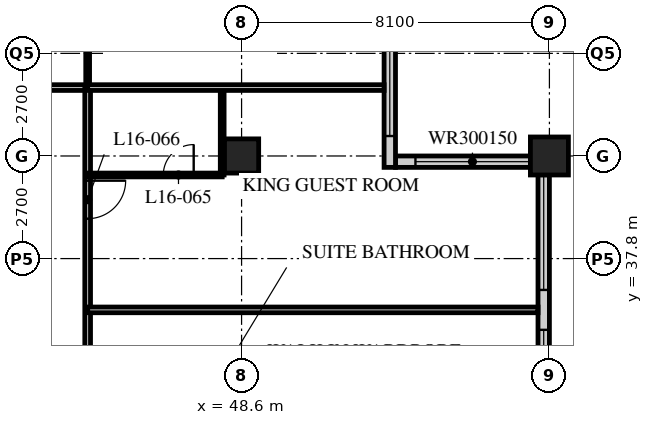
"""IFC4 building model, lengths in metres.
Left out: names, types, materials, properties, quantities, classifications, styles, units other than length and angle.
Written with IfcOpenShell. Run it as: python <this file> out.ifc"""

import sys

from ifc_helpers import new_model, si_unit, direction, frame, frame_2d, origin, origin_2d, place, context, subcontext, project, spatial, rectangle, hollow_rectangle, extrude, element, fill, save


model = new_model("IFC4")
c1 = context("Model", 3, precision=1e-05, world=origin(), true_north=direction((0.0, 1.0)))
c2 = subcontext(c1, "Body", "Model", "MODEL_VIEW")
j1 = project(units=[si_unit("LENGTHUNIT", "METRE"), si_unit("PLANEANGLEUNIT", "RADIAN")], contexts=[c1])
p1 = place(None, origin())
s1 = spatial("IfcSite", under=j1, at=p1, CompositionType="ELEMENT")
p2 = place(p1, origin())
s2 = spatial("IfcBuilding", under=s1, at=p2, CompositionType="ELEMENT")
p3 = place(p2, frame((0.0, 0.0, 67.0)))
s3 = spatial("IfcBuildingStorey", under=s2, at=p3, CompositionType="ELEMENT", Elevation=67.0)
p4 = place(p3, frame((48.6, 40.5, 0.0), z_axis=(0.0, 0.0, 1.0), x_axis=(1.0, 0.0, 0.0)))
e1 = element("IfcColumn", 1, at=p4, inside=s3, PredefinedType="COLUMN", context=c2, shape_type="SweptSolid", body=[
    extrude(hollow_rectangle(XDim=0.9, YDim=0.9, WallThickness=0.09, at=origin_2d()), origin(), (0.0, 0.0, 1.0), 3.4),
])
p5 = place(p3, frame((56.7, 40.5, 0.0), z_axis=(0.0, 0.0, 1.0), x_axis=(1.0, 0.0, 0.0)))
e2 = element("IfcColumn", 2, at=p5, inside=s3, PredefinedType="COLUMN", context=c2, shape_type="SweptSolid", body=[
    extrude(hollow_rectangle(XDim=1.0, YDim=1.0, WallThickness=0.1, at=origin_2d()), origin(), (0.0, 0.0, 1.0), 3.4),
])
p6 = place(p3, frame((56.55, 8.4, 0.0), z_axis=(0.0, 0.0, 1.0), x_axis=(0.0, 1.0, 0.0)))
e3 = element("IfcWall", 3, at=p6, inside=s3, PredefinedType="SOLIDWALL", context=c2, shape_type="SweptSolid", body=[
    extrude(rectangle(XDim=32.1, YDim=0.3, at=frame_2d((16.05, 0.0))), origin(), (0.0, 0.0, 1.0), 3.19),
])
p7 = place(p6, frame((0.225, 0.0, 0.9)))
e4 = element("IfcOpeningElement", 4, at=p7, cuts=e3, PredefinedType="OPENING", context=c2, shape_type="SweptSolid", body=[
    extrude(rectangle(XDim=3.0, YDim=2.0, at=frame_2d((1.5, 1.0))), frame((0.0, 0.16, 0.0), z_axis=(0.0, -1.0, 0.0), x_axis=(1.0, 0.0, 0.0)), (0.0, 0.0, 1.0), 0.32),
])
p8 = place(p6, frame((4.275, 0.0, 0.9)))
e5 = element("IfcOpeningElement", 5, at=p8, cuts=e3, PredefinedType="OPENING", context=c2, shape_type="SweptSolid", body=[
    extrude(rectangle(XDim=3.0, YDim=2.0, at=frame_2d((1.5, 1.0))), frame((0.0, 0.16, 0.0), z_axis=(0.0, -1.0, 0.0), x_axis=(1.0, 0.0, 0.0)), (0.0, 0.0, 1.0), 0.32),
])
p9 = place(p6, frame((8.325, 0.0, 0.9)))
e6 = element("IfcOpeningElement", 6, at=p9, cuts=e3, PredefinedType="OPENING", context=c2, shape_type="SweptSolid", body=[
    extrude(rectangle(XDim=3.0, YDim=2.0, at=frame_2d((1.5, 1.0))), frame((0.0, 0.16, 0.0), z_axis=(0.0, -1.0, 0.0), x_axis=(1.0, 0.0, 0.0)), (0.0, 0.0, 1.0), 0.32),
])
p10 = place(p6, frame((12.375, 0.0, 0.9)))
e7 = element("IfcOpeningElement", 7, at=p10, cuts=e3, PredefinedType="OPENING", context=c2, shape_type="SweptSolid", body=[
    extrude(rectangle(XDim=3.0, YDim=2.0, at=frame_2d((1.5, 1.0))), frame((0.0, 0.16, 0.0), z_axis=(0.0, -1.0, 0.0), x_axis=(1.0, 0.0, 0.0)), (0.0, 0.0, 1.0), 0.32),
])
p11 = place(p6, frame((16.425, 0.0, 0.9)))
e8 = element("IfcOpeningElement", 8, at=p11, cuts=e3, PredefinedType="OPENING", context=c2, shape_type="SweptSolid", body=[
    extrude(rectangle(XDim=3.0, YDim=2.0, at=frame_2d((1.5, 1.0))), frame((0.0, 0.16, 0.0), z_axis=(0.0, -1.0, 0.0), x_axis=(1.0, 0.0, 0.0)), (0.0, 0.0, 1.0), 0.32),
])
p12 = place(p6, frame((20.475, 0.0, 0.9)))
e9 = element("IfcOpeningElement", 9, at=p12, cuts=e3, PredefinedType="OPENING", context=c2, shape_type="SweptSolid", body=[
    extrude(rectangle(XDim=3.0, YDim=2.0, at=frame_2d((1.5, 1.0))), frame((0.0, 0.16, 0.0), z_axis=(0.0, -1.0, 0.0), x_axis=(1.0, 0.0, 0.0)), (0.0, 0.0, 1.0), 0.32),
])
p13 = place(p6, frame((24.525, 0.0, 0.9)))
e10 = element("IfcOpeningElement", 10, at=p13, cuts=e3, PredefinedType="OPENING", context=c2, shape_type="SweptSolid", body=[
    extrude(rectangle(XDim=3.0, YDim=2.0, at=frame_2d((1.5, 1.0))), frame((0.0, 0.16, 0.0), z_axis=(0.0, -1.0, 0.0), x_axis=(1.0, 0.0, 0.0)), (0.0, 0.0, 1.0), 0.32),
])
p14 = place(p6, frame((28.575, 0.0, 0.9)))
e11 = element("IfcOpeningElement", 11, at=p14, cuts=e3, PredefinedType="OPENING", context=c2, shape_type="SweptSolid", body=[
    extrude(rectangle(XDim=3.0, YDim=2.0, at=frame_2d((1.5, 1.0))), frame((0.0, 0.16, 0.0), z_axis=(0.0, -1.0, 0.0), x_axis=(1.0, 0.0, 0.0)), (0.0, 0.0, 1.0), 0.32),
])
p15 = place(p3, frame((56.4, 40.35, 0.0), z_axis=(0.0, 0.0, 1.0), x_axis=(-1.0, 0.0, 0.0)))
e12 = element("IfcWall", 12, at=p15, inside=s3, PredefinedType="SOLIDWALL", context=c2, shape_type="SweptSolid", body=[
    extrude(rectangle(XDim=3.75, YDim=0.3, at=frame_2d((1.875, 0.0))), origin(), (0.0, 0.0, 1.0), 3.19),
])
p16 = place(p15, frame((0.225, 0.0, 0.9)))
e13 = element("IfcOpeningElement", 13, at=p16, cuts=e12, PredefinedType="OPENING", context=c2, shape_type="SweptSolid", body=[
    extrude(rectangle(XDim=3.0, YDim=1.5, at=frame_2d((1.5, 0.75))), frame((0.0, 0.16, 0.0), z_axis=(0.0, -1.0, 0.0), x_axis=(1.0, 0.0, 0.0)), (0.0, 0.0, 1.0), 0.32),
])
p17 = place(p3, frame((52.5, 40.2, 0.0), z_axis=(0.0, 0.0, 1.0), x_axis=(0.0, 1.0, 0.0)))
e14 = element("IfcWall", 14, at=p17, inside=s3, PredefinedType="SOLIDWALL", context=c2, shape_type="SweptSolid", body=[
    extrude(rectangle(XDim=4.35, YDim=0.3, at=frame_2d((2.175, 0.0))), origin(), (0.0, 0.0, 1.0), 3.19),
])
p18 = place(p17, frame((0.825, 0.0, 0.9)))
e15 = element("IfcOpeningElement", 15, at=p18, cuts=e14, PredefinedType="OPENING", context=c2, shape_type="SweptSolid", body=[
    extrude(rectangle(XDim=3.0, YDim=1.5, at=frame_2d((1.5, 0.75))), frame((0.0, 0.16, 0.0), z_axis=(0.0, -1.0, 0.0), x_axis=(1.0, 0.0, 0.0)), (0.0, 0.0, 1.0), 0.32),
])
p19 = place(p3, frame((8.1, 42.3, 0.0), z_axis=(0.0, 0.0, 1.0), x_axis=(1.0, 0.0, 0.0)))
e16 = element("IfcWall", 16, at=p19, inside=s3, PredefinedType="PARTITIONING", context=c2, shape_type="SweptSolid", body=[
    extrude(rectangle(XDim=36.45, YDim=0.15, at=frame_2d((18.225, 0.0))), origin(), (0.0, 0.0, 1.0), 3.19),
])
p20 = place(p19, frame((9.5, 0.0, 0.0)))
e17 = element("IfcOpeningElement", 17, at=p20, cuts=e16, PredefinedType="OPENING", context=c2, shape_type="SweptSolid", body=[
    extrude(rectangle(XDim=1.0, YDim=2.1, at=frame_2d((0.5, 1.05))), frame((0.0, 0.085, 0.0), z_axis=(0.0, -1.0, 0.0), x_axis=(1.0, 0.0, 0.0)), (0.0, 0.0, 1.0), 0.17),
])
p21 = place(p19, frame((14.6, 0.0, 0.0)))
e18 = element("IfcOpeningElement", 18, at=p21, cuts=e16, PredefinedType="OPENING", context=c2, shape_type="SweptSolid", body=[
    extrude(rectangle(XDim=1.0, YDim=2.1, at=frame_2d((0.5, 1.05))), frame((0.0, 0.085, 0.0), z_axis=(0.0, -1.0, 0.0), x_axis=(1.0, 0.0, 0.0)), (0.0, 0.0, 1.0), 0.17),
])
p22 = place(p19, frame((18.65, 0.0, 0.0)))
e19 = element("IfcOpeningElement", 19, at=p22, cuts=e16, PredefinedType="OPENING", context=c2, shape_type="SweptSolid", body=[
    extrude(rectangle(XDim=1.0, YDim=2.1, at=frame_2d((0.5, 1.05))), frame((0.0, 0.085, 0.0), z_axis=(0.0, -1.0, 0.0), x_axis=(1.0, 0.0, 0.0)), (0.0, 0.0, 1.0), 0.17),
])
p23 = place(p19, frame((25.7, 0.0, 0.0)))
e20 = element("IfcOpeningElement", 20, at=p23, cuts=e16, PredefinedType="OPENING", context=c2, shape_type="SweptSolid", body=[
    extrude(rectangle(XDim=1.0, YDim=2.1, at=frame_2d((0.5, 1.05))), frame((0.0, 0.085, 0.0), z_axis=(0.0, -1.0, 0.0), x_axis=(1.0, 0.0, 0.0)), (0.0, 0.0, 1.0), 0.17),
])
p24 = place(p19, frame((30.8, 0.0, 0.0)))
e21 = element("IfcOpeningElement", 21, at=p24, cuts=e16, PredefinedType="OPENING", context=c2, shape_type="SweptSolid", body=[
    extrude(rectangle(XDim=1.0, YDim=2.1, at=frame_2d((0.5, 1.05))), frame((0.0, 0.085, 0.0), z_axis=(0.0, -1.0, 0.0), x_axis=(1.0, 0.0, 0.0)), (0.0, 0.0, 1.0), 0.17),
])
p25 = place(p19, frame((32.825, 0.0, 0.0)))
e22 = element("IfcOpeningElement", 22, at=p25, cuts=e16, PredefinedType="OPENING", context=c2, shape_type="SweptSolid", body=[
    extrude(rectangle(XDim=1.0, YDim=2.1, at=frame_2d((0.5, 1.05))), frame((0.0, 0.085, 0.0), z_axis=(0.0, -1.0, 0.0), x_axis=(1.0, 0.0, 0.0)), (0.0, 0.0, 1.0), 0.17),
])
p26 = place(p19, frame((2.625, 0.0, 0.0)))
e23 = element("IfcOpeningElement", 23, at=p26, cuts=e16, PredefinedType="OPENING", context=c2, shape_type="SweptSolid", body=[
    extrude(rectangle(XDim=1.0, YDim=2.1, at=frame_2d((0.5, 1.05))), frame((0.0, 0.085, 0.0), z_axis=(0.0, -1.0, 0.0), x_axis=(1.0, 0.0, 0.0)), (0.0, 0.0, 1.0), 0.17),
])
p27 = place(p3, frame((44.55, 12.15, 0.0), z_axis=(0.0, 0.0, 1.0), x_axis=(0.0, 1.0, 0.0)))
e24 = element("IfcWall", 24, at=p27, inside=s3, PredefinedType="PARTITIONING", context=c2, shape_type="SweptSolid", body=[
    extrude(rectangle(XDim=30.15, YDim=0.15, at=frame_2d((15.075, 0.0))), origin(), (0.0, 0.0, 1.0), 3.19),
])
p28 = place(p27, frame((2.45, 0.0, 0.0)))
e25 = element("IfcOpeningElement", 25, at=p28, cuts=e24, PredefinedType="OPENING", context=c2, shape_type="SweptSolid", body=[
    extrude(rectangle(XDim=1.0, YDim=2.1, at=frame_2d((0.5, 1.05))), frame((0.0, 0.085, 0.0), z_axis=(0.0, -1.0, 0.0), x_axis=(1.0, 0.0, 0.0)), (0.0, 0.0, 1.0), 0.17),
])
p29 = place(p27, frame((4.35, 0.0, 0.0)))
e26 = element("IfcOpeningElement", 26, at=p29, cuts=e24, PredefinedType="OPENING", context=c2, shape_type="SweptSolid", body=[
    extrude(rectangle(XDim=1.0, YDim=2.1, at=frame_2d((0.5, 1.05))), frame((0.0, 0.085, 0.0), z_axis=(0.0, -1.0, 0.0), x_axis=(1.0, 0.0, 0.0)), (0.0, 0.0, 1.0), 0.17),
])
p30 = place(p27, frame((8.4, 0.0, 0.0)))
e27 = element("IfcOpeningElement", 27, at=p30, cuts=e24, PredefinedType="OPENING", context=c2, shape_type="SweptSolid", body=[
    extrude(rectangle(XDim=1.0, YDim=2.1, at=frame_2d((0.5, 1.05))), frame((0.0, 0.085, 0.0), z_axis=(0.0, -1.0, 0.0), x_axis=(1.0, 0.0, 0.0)), (0.0, 0.0, 1.0), 0.17),
])
p31 = place(p27, frame((14.6, 0.0, 0.0)))
e28 = element("IfcOpeningElement", 28, at=p31, cuts=e24, PredefinedType="OPENING", context=c2, shape_type="SweptSolid", body=[
    extrude(rectangle(XDim=1.0, YDim=2.1, at=frame_2d((0.5, 1.05))), frame((0.0, 0.085, 0.0), z_axis=(0.0, -1.0, 0.0), x_axis=(1.0, 0.0, 0.0)), (0.0, 0.0, 1.0), 0.17),
])
p32 = place(p27, frame((21.65, 0.0, 0.0)))
e29 = element("IfcOpeningElement", 29, at=p32, cuts=e24, PredefinedType="OPENING", context=c2, shape_type="SweptSolid", body=[
    extrude(rectangle(XDim=1.0, YDim=2.1, at=frame_2d((0.5, 1.05))), frame((0.0, 0.085, 0.0), z_axis=(0.0, -1.0, 0.0), x_axis=(1.0, 0.0, 0.0)), (0.0, 0.0, 1.0), 0.17),
])
p33 = place(p27, frame((26.7, 0.0, 0.0)))
e30 = element("IfcOpeningElement", 30, at=p33, cuts=e24, PredefinedType="OPENING", context=c2, shape_type="SweptSolid", body=[
    extrude(rectangle(XDim=1.0, YDim=2.1, at=frame_2d((0.5, 1.05))), frame((0.0, 0.085, 0.0), z_axis=(0.0, -1.0, 0.0), x_axis=(1.0, 0.0, 0.0)), (0.0, 0.0, 1.0), 0.17),
])
p34 = place(p3, frame((44.55, 36.45, 0.0), z_axis=(0.0, 0.0, 1.0), x_axis=(1.0, 0.0, 0.0)))
e31 = element("IfcWall", 31, at=p34, inside=s3, PredefinedType="PARTITIONING", context=c2, shape_type="SweptSolid", body=[
    extrude(rectangle(XDim=11.85, YDim=0.15, at=frame_2d((5.925, 0.0))), origin(), (0.0, 0.0, 1.0), 3.19),
])
p35 = place(p3, frame((48.09, 40.0, 0.0), z_axis=(0.0, 0.0, 1.0), x_axis=(0.0, 1.0, 0.0)))
e32 = element("IfcWall", 32, at=p35, inside=s3, PredefinedType="PARTITIONING", context=c2, shape_type="SweptSolid", body=[
    extrude(rectangle(XDim=2.3, YDim=0.1, at=frame_2d((1.15, 0.0))), origin(), (0.0, 0.0, 1.0), 3.19),
])
p36 = place(p3, frame((44.55, 40.0, 0.0), z_axis=(0.0, 0.0, 1.0), x_axis=(1.0, 0.0, 0.0)))
e33 = element("IfcWall", 33, at=p36, inside=s3, PredefinedType="PARTITIONING", context=c2, shape_type="SweptSolid", body=[
    extrude(rectangle(XDim=3.54, YDim=0.1, at=frame_2d((1.77, 0.0))), origin(), (0.0, 0.0, 1.0), 3.19),
])
p37 = place(p36, frame((1.99, 0.0, 0.0)))
e34 = element("IfcOpeningElement", 34, at=p37, cuts=e33, PredefinedType="OPENING", context=c2, shape_type="SweptSolid", body=[
    extrude(rectangle(XDim=0.8, YDim=2.1, at=frame_2d((0.4, 1.05))), frame((0.0, 0.06, 0.0), z_axis=(0.0, -1.0, 0.0), x_axis=(1.0, 0.0, 0.0)), (0.0, 0.0, 1.0), 0.12),
])
p38 = place(p3, frame((44.55, 42.3, 0.0), z_axis=(0.0, 0.0, 1.0), x_axis=(0.0, 1.0, 0.0)))
e35 = element("IfcWall", 35, at=p38, inside=s3, PredefinedType="PARTITIONING", context=c2, shape_type="SweptSolid", body=[
    extrude(rectangle(XDim=2.4, YDim=0.1, at=frame_2d((1.2, 0.0))), origin(), (0.0, 0.0, 1.0), 3.19),
])
p39 = place(p3, frame((44.55, 42.3, 0.0), z_axis=(0.0, 0.0, 1.0), x_axis=(1.0, 0.0, 0.0)))
e36 = element("IfcWall", 36, at=p39, inside=s3, PredefinedType="PARTITIONING", context=c2, shape_type="SweptSolid", body=[
    extrude(rectangle(XDim=7.8, YDim=0.15, at=frame_2d((3.9, 0.0))), origin(), (0.0, 0.0, 1.0), 3.19),
])
p40 = place(p13, origin())
e37 = element("IfcWindow", 37, at=p40, inside=s3, PartitioningType="SINGLE_PANEL", PredefinedType="WINDOW", context=c2, shape_type="SweptSolid", body=[
    extrude(rectangle(XDim=3.0, YDim=2.0, at=frame_2d((1.5, 1.0))), frame((0.0, 0.03, 0.0), z_axis=(0.0, -1.0, 0.0), x_axis=(1.0, 0.0, 0.0)), (0.0, 0.0, 1.0), 0.06),
])
fill(e10, e37)
p41 = place(p14, origin())
e38 = element("IfcWindow", 38, at=p41, inside=s3, PartitioningType="SINGLE_PANEL", PredefinedType="WINDOW", context=c2, shape_type="SweptSolid", body=[
    extrude(rectangle(XDim=3.0, YDim=2.0, at=frame_2d((1.5, 1.0))), frame((0.0, 0.03, 0.0), z_axis=(0.0, -1.0, 0.0), x_axis=(1.0, 0.0, 0.0)), (0.0, 0.0, 1.0), 0.06),
])
fill(e11, e38)
p42 = place(p16, origin())
e39 = element("IfcWindow", 39, at=p42, inside=s3, PartitioningType="SINGLE_PANEL", PredefinedType="WINDOW", context=c2, shape_type="SweptSolid", body=[
    extrude(rectangle(XDim=3.0, YDim=1.5, at=frame_2d((1.5, 0.75))), frame((0.0, 0.03, 0.0), z_axis=(0.0, -1.0, 0.0), x_axis=(1.0, 0.0, 0.0)), (0.0, 0.0, 1.0), 0.06),
])
fill(e13, e39)
p43 = place(p18, origin())
e40 = element("IfcWindow", 40, at=p43, inside=s3, PartitioningType="SINGLE_PANEL", PredefinedType="WINDOW", context=c2, shape_type="SweptSolid", body=[
    extrude(rectangle(XDim=3.0, YDim=1.5, at=frame_2d((1.5, 0.75))), frame((0.0, 0.03, 0.0), z_axis=(0.0, -1.0, 0.0), x_axis=(1.0, 0.0, 0.0)), (0.0, 0.0, 1.0), 0.06),
])
fill(e15, e40)
p44 = place(p37, origin())
e41 = element("IfcDoor", 41, at=p44, inside=s3, OperationType="SINGLE_SWING_RIGHT", PredefinedType="DOOR", context=c2, shape_type="SweptSolid", body=[
    extrude(rectangle(XDim=0.8, YDim=2.1, at=frame_2d((0.4, 1.05))), frame((0.0, 0.025, 0.0), z_axis=(0.0, -1.0, 0.0), x_axis=(1.0, 0.0, 0.0)), (0.0, 0.0, 1.0), 0.05),
])
fill(e34, e41)
p45 = place(p33, origin())
e42 = element("IfcDoor", 42, at=p45, inside=s3, OperationType="SINGLE_SWING_LEFT", PredefinedType="DOOR", context=c2, shape_type="SweptSolid", body=[
    extrude(rectangle(XDim=1.0, YDim=2.1, at=frame_2d((0.5, 1.05))), frame((0.0, 0.025, 0.0), z_axis=(0.0, -1.0, 0.0), x_axis=(1.0, 0.0, 0.0)), (0.0, 0.0, 1.0), 0.05),
])
fill(e30, e42)
save(model, sys.argv[1])
